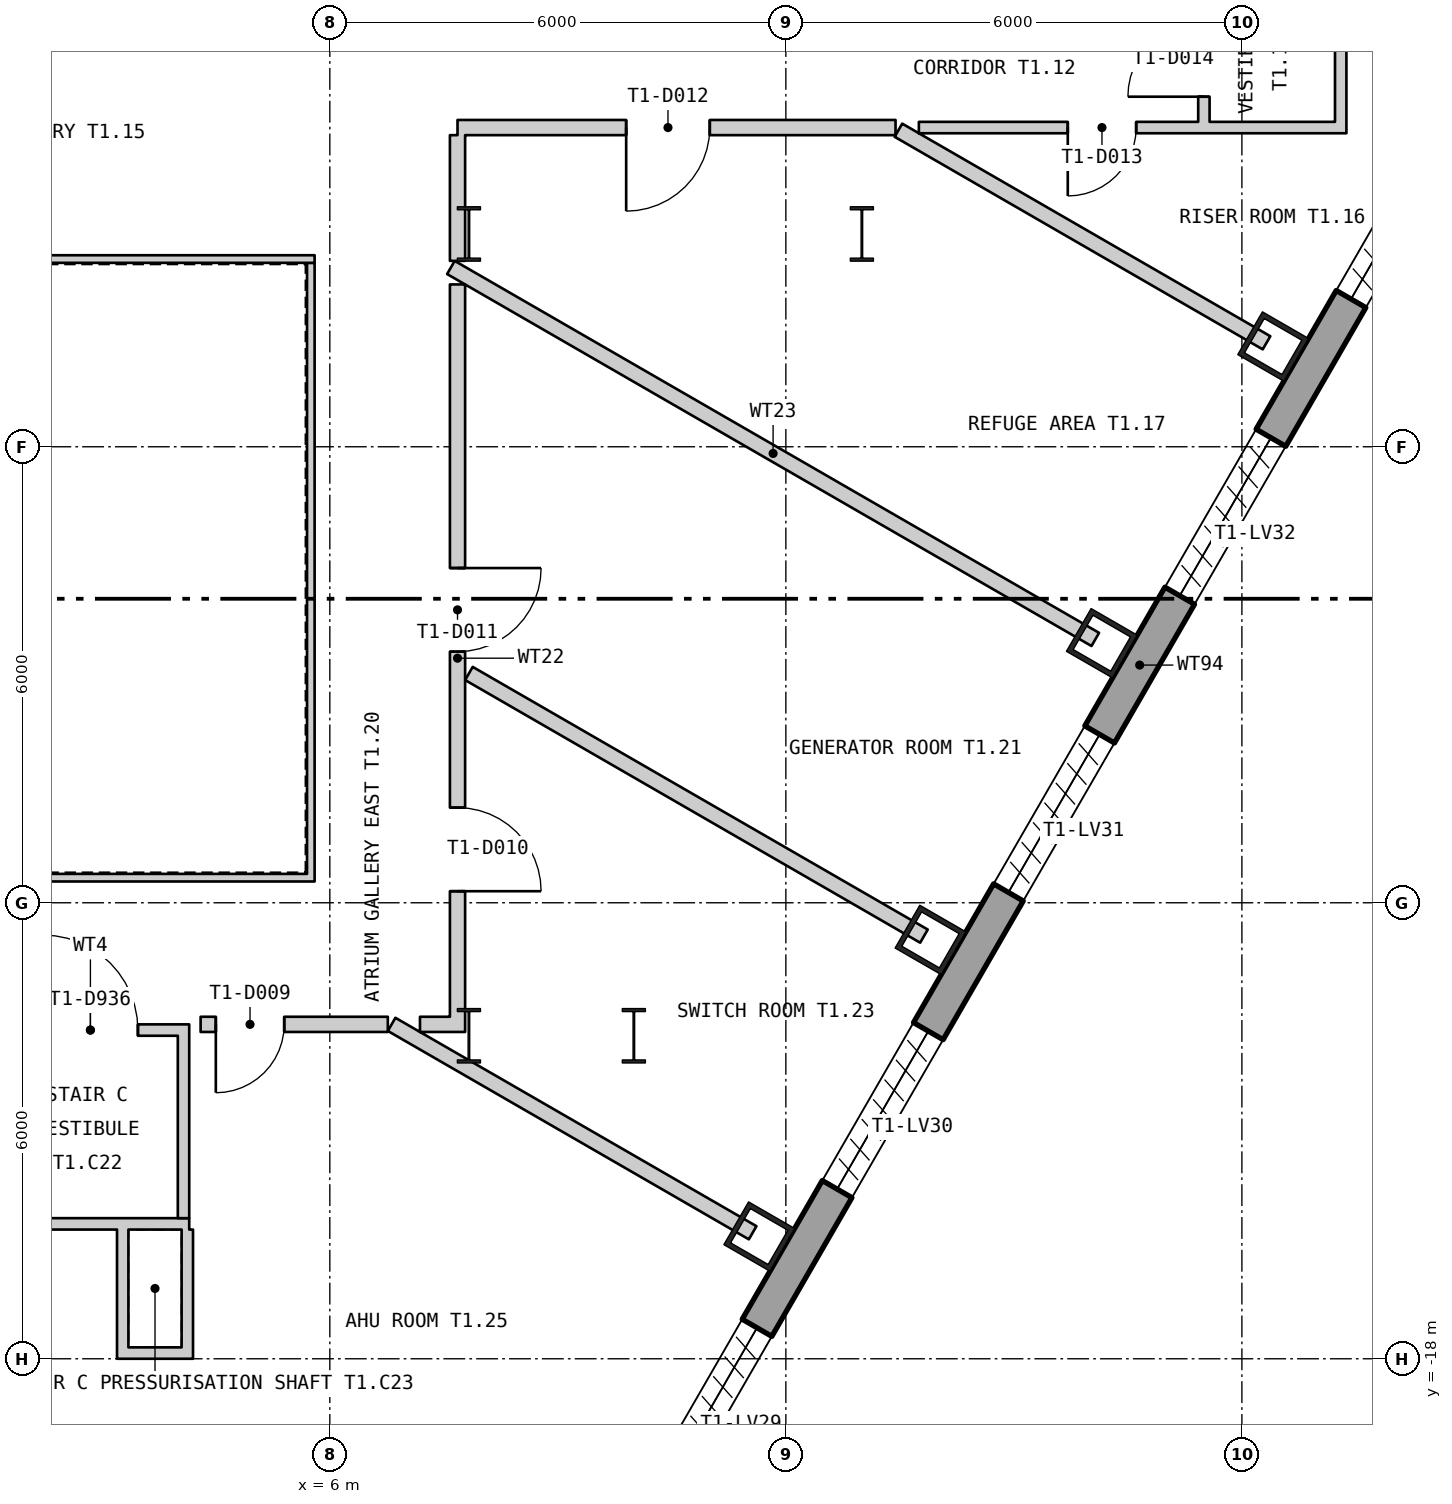
"""IFC4 building model, lengths in metres.
Left out: names, types, materials, properties, quantities, classifications, styles, units other than length and angle.
Written with IfcOpenShell. Run it as: python <this file> out.ifc"""

import sys

from ifc_helpers import new_model, si_unit, direction, frame, frame_2d, origin, origin_2d, place, context, subcontext, project, spatial, polyline, rectangle, hollow_rectangle, i_section, outline, extrude, element, fill, save


model = new_model("IFC4")
c1 = context("Model", 3, precision=1e-05, world=origin(), true_north=direction((0.0, 1.0)))
c2 = subcontext(c1, "Body", "Model", "MODEL_VIEW")
j1 = project(units=[si_unit("LENGTHUNIT", "METRE"), si_unit("PLANEANGLEUNIT", "RADIAN")], contexts=[c1])
p1 = place(None, origin())
s1 = spatial("IfcSite", under=j1, at=p1, CompositionType="ELEMENT")
p2 = place(p1, origin())
s2 = spatial("IfcBuilding", under=s1, at=p2, CompositionType="ELEMENT")
p3 = place(p2, frame((0.0, 0.0, 78.3)))
s3 = spatial("IfcBuildingStorey", under=s2, at=p3, CompositionType="ELEMENT", Elevation=78.3)
for number, where, z_axis, x_axis in (
    (1, (11.65, -16.392, 0.0), (0.0, 0.0, 1.0), (0.5, 0.866, 0.0)),
    (2, (13.903, -12.489, 0.0), (0.0, 0.0, 1.0), (0.5, 0.866, 0.0)),
    (3, (16.157, -8.585, 0.0), (0.0, 0.0, 1.0), (0.5, 0.866, 0.0)),
    (4, (18.411, -4.681, 0.0), (0.0, 0.0, 1.0), (0.5, 0.866, 0.0)),
):
    element("IfcColumn", number, at=place(p3, frame(where, z_axis=z_axis, x_axis=x_axis)), inside=s3, PredefinedType="COLUMN", context=c2, shape_type="SweptSolid", body=[
        extrude(hollow_rectangle(XDim=0.65, YDim=0.7, WallThickness=0.065, at=origin_2d()), origin(), (0.0, 0.0, 1.0), 6.0),
    ])
for number, where, z_axis, x_axis in (
    (5, (7.83, -3.2, 0.0), (0.0, 0.0, 1.0), (1.0, 0.0, 0.0)),
    (6, (7.83, -13.75, 0.0), (0.0, 0.0, 1.0), (1.0, 0.0, 0.0)),
    (7, (13.0, -3.2, 0.0), (0.0, 0.0, 1.0), (1.0, 0.0, 0.0)),
    (8, (10.0, -13.75, 0.0), (0.0, 0.0, 1.0), (1.0, 0.0, 0.0)),
):
    element("IfcColumn", number, at=place(p3, frame(where, z_axis=z_axis, x_axis=x_axis)), inside=s3, PredefinedType="COLUMN", context=c2, shape_type="SweptSolid", body=[
        extrude(i_section(OverallWidth=0.304, OverallDepth=0.716, WebThickness=0.021, FlangeThickness=0.04, at=origin_2d()), origin(), (0.0, 0.0, 1.0), 6.0),
    ])
p4 = place(p3, frame((5.22, -28.679, -0.18), z_axis=(0.0, 0.0, 1.0), x_axis=(0.500000711659, 0.866024992908, 0.0)))
e9 = element("IfcWall", 9, at=p4, inside=s3, PredefinedType="SOLIDWALL", context=c2, shape_type="SweptSolid", body=[
    extrude(outline(polyline([(-0.13, -0.225), (45.87, -0.225), (45.61, 0.225), (0.13, 0.225), (-0.13, -0.225)])), origin(), (0.0, 0.0, 1.0), 6.0),
])
p5 = place(p4, frame((1.424, 0.0, 1.38)))
e10 = element("IfcOpeningElement", 10, at=p5, cuts=e9, PredefinedType="OPENING", context=c2, shape_type="SweptSolid", body=[
    extrude(rectangle(XDim=2.4, YDim=3.6, at=frame_2d((1.2, 1.8))), frame((0.0, 0.235, 0.0), z_axis=(0.0, -1.0, 0.0), x_axis=(1.0, 0.0, 0.0)), (0.0, 0.0, 1.0), 0.47),
])
p6 = place(p4, frame((5.893, 0.0, 1.38)))
e11 = element("IfcOpeningElement", 11, at=p6, cuts=e9, PredefinedType="OPENING", context=c2, shape_type="SweptSolid", body=[
    extrude(rectangle(XDim=2.4, YDim=3.6, at=frame_2d((1.2, 1.8))), frame((0.0, 0.235, 0.0), z_axis=(0.0, -1.0, 0.0), x_axis=(1.0, 0.0, 0.0)), (0.0, 0.0, 1.0), 0.47),
])
p7 = place(p4, frame((10.401, 0.0, 1.38)))
e12 = element("IfcOpeningElement", 12, at=p7, cuts=e9, PredefinedType="OPENING", context=c2, shape_type="SweptSolid", body=[
    extrude(rectangle(XDim=2.4, YDim=3.6, at=frame_2d((1.2, 1.8))), frame((0.0, 0.235, 0.0), z_axis=(0.0, -1.0, 0.0), x_axis=(1.0, 0.0, 0.0)), (0.0, 0.0, 1.0), 0.47),
])
p8 = place(p4, frame((14.909, 0.0, 1.38)))
e13 = element("IfcOpeningElement", 13, at=p8, cuts=e9, PredefinedType="OPENING", context=c2, shape_type="SweptSolid", body=[
    extrude(rectangle(XDim=2.4, YDim=3.6, at=frame_2d((1.2, 1.8))), frame((0.0, 0.235, 0.0), z_axis=(0.0, -1.0, 0.0), x_axis=(1.0, 0.0, 0.0)), (0.0, 0.0, 1.0), 0.47),
])
p9 = place(p4, frame((19.416, 0.0, 1.38)))
e14 = element("IfcOpeningElement", 14, at=p9, cuts=e9, PredefinedType="OPENING", context=c2, shape_type="SweptSolid", body=[
    extrude(rectangle(XDim=2.4, YDim=3.6, at=frame_2d((1.2, 1.8))), frame((0.0, 0.235, 0.0), z_axis=(0.0, -1.0, 0.0), x_axis=(1.0, 0.0, 0.0)), (0.0, 0.0, 1.0), 0.47),
])
p10 = place(p4, frame((23.924, 0.0, 1.38)))
e15 = element("IfcOpeningElement", 15, at=p10, cuts=e9, PredefinedType="OPENING", context=c2, shape_type="SweptSolid", body=[
    extrude(rectangle(XDim=2.4, YDim=3.6, at=frame_2d((1.2, 1.8))), frame((0.0, 0.235, 0.0), z_axis=(0.0, -1.0, 0.0), x_axis=(1.0, 0.0, 0.0)), (0.0, 0.0, 1.0), 0.47),
])
p11 = place(p4, frame((28.431, 0.0, 1.38)))
e16 = element("IfcOpeningElement", 16, at=p11, cuts=e9, PredefinedType="OPENING", context=c2, shape_type="SweptSolid", body=[
    extrude(rectangle(XDim=2.4, YDim=3.6, at=frame_2d((1.2, 1.8))), frame((0.0, 0.235, 0.0), z_axis=(0.0, -1.0, 0.0), x_axis=(1.0, 0.0, 0.0)), (0.0, 0.0, 1.0), 0.47),
])
p12 = place(p4, frame((32.939, 0.0, 1.38)))
e17 = element("IfcOpeningElement", 17, at=p12, cuts=e9, PredefinedType="OPENING", context=c2, shape_type="SweptSolid", body=[
    extrude(rectangle(XDim=2.4, YDim=3.6, at=frame_2d((1.2, 1.8))), frame((0.0, 0.235, 0.0), z_axis=(0.0, -1.0, 0.0), x_axis=(1.0, 0.0, 0.0)), (0.0, 0.0, 1.0), 0.47),
])
p13 = place(p4, frame((37.447, 0.0, 1.38)))
e18 = element("IfcOpeningElement", 18, at=p13, cuts=e9, PredefinedType="OPENING", context=c2, shape_type="SweptSolid", body=[
    extrude(rectangle(XDim=2.4, YDim=3.6, at=frame_2d((1.2, 1.8))), frame((0.0, 0.235, 0.0), z_axis=(0.0, -1.0, 0.0), x_axis=(1.0, 0.0, 0.0)), (0.0, 0.0, 1.0), 0.47),
])
p14 = place(p4, frame((41.916, 0.0, 1.38)))
e19 = element("IfcOpeningElement", 19, at=p14, cuts=e9, PredefinedType="OPENING", context=c2, shape_type="SweptSolid", body=[
    extrude(rectangle(XDim=2.4, YDim=3.6, at=frame_2d((1.2, 1.8))), frame((0.0, 0.235, 0.0), z_axis=(0.0, -1.0, 0.0), x_axis=(1.0, 0.0, 0.0)), (0.0, 0.0, 1.0), 0.47),
])
p15 = place(p3, frame((-5.8, -11.67, 0.0), z_axis=(0.0, 0.0, 1.0), x_axis=(1.0, 0.0, 0.0)))
e20 = element("IfcWall", 20, at=p15, inside=s3, PredefinedType="PARTITIONING", context=c2, shape_type="SweptSolid", body=[
    extrude(rectangle(XDim=11.6, YDim=0.1, at=frame_2d((5.8, 0.0))), origin(), (0.0, 0.0, 1.0), 5.8),
])
p16 = place(p3, frame((5.75, -11.62, 0.0), z_axis=(0.0, 0.0, 1.0), x_axis=(0.0, 1.0, 0.0)))
e21 = element("IfcWall", 21, at=p16, inside=s3, PredefinedType="PARTITIONING", context=c2, shape_type="SweptSolid", body=[
    extrude(rectangle(XDim=8.04, YDim=0.1, at=frame_2d((4.02, 0.0))), origin(), (0.0, 0.0, 1.0), 5.8),
])
p17 = place(p3, frame((5.8, -3.53, 0.0), z_axis=(0.0, 0.0, 1.0), x_axis=(-1.0, 0.0, 0.0)))
e22 = element("IfcWall", 22, at=p17, inside=s3, PredefinedType="PARTITIONING", context=c2, shape_type="SweptSolid", body=[
    extrude(rectangle(XDim=11.6, YDim=0.1, at=frame_2d((5.8, 0.0))), origin(), (0.0, 0.0, 1.0), 5.8),
])
p18 = place(p3, frame((1.55, -16.225, 0.0), z_axis=(0.0, 0.0, 1.0), x_axis=(1.0, 0.0, 0.0)))
e23 = element("IfcWall", 23, at=p18, inside=s3, PredefinedType="PARTITIONING", context=c2, shape_type="SweptSolid", body=[
    extrude(rectangle(XDim=2.6, YDim=0.15, at=frame_2d((1.3, 0.0))), origin(), (0.0, 0.0, 1.0), 5.8),
])
p19 = place(p3, frame((4.075, -16.15, 0.0), z_axis=(0.0, 0.0, 1.0), x_axis=(0.0, 1.0, 0.0)))
e24 = element("IfcWall", 24, at=p19, inside=s3, PredefinedType="PARTITIONING", context=c2, shape_type="SweptSolid", body=[
    extrude(rectangle(XDim=2.4, YDim=0.15, at=frame_2d((1.2, 0.0))), origin(), (0.0, 0.0, 1.0), 5.8),
])
p20 = place(p3, frame((1.55, -13.675, 0.0), z_axis=(0.0, 0.0, 1.0), x_axis=(1.0, 0.0, 0.0)))
e25 = element("IfcWall", 25, at=p20, inside=s3, PredefinedType="PARTITIONING", context=c2, shape_type="SweptSolid", body=[
    extrude(rectangle(XDim=2.6, YDim=0.15, at=frame_2d((1.3, 0.0))), origin(), (0.0, 0.0, 1.0), 4.89),
])
p21 = place(p20, frame((0.675, 0.0, 0.0)))
e26 = element("IfcOpeningElement", 26, at=p21, cuts=e25, PredefinedType="OPENING", context=c2, shape_type="SweptSolid", body=[
    extrude(rectangle(XDim=1.25, YDim=2.1, at=frame_2d((0.625, 1.05))), frame((0.0, 0.085, 0.0), z_axis=(0.0, -1.0, 0.0), x_axis=(1.0, 0.0, 0.0)), (0.0, 0.0, 1.0), 0.17),
])
p22 = place(p3, frame((3.275, -18.0, 0.0), z_axis=(0.0, 0.0, 1.0), x_axis=(0.0, 1.0, 0.0)))
e27 = element("IfcWall", 27, at=p22, inside=s3, PredefinedType="PARTITIONING", context=c2, shape_type="SweptSolid", body=[
    extrude(rectangle(XDim=1.7, YDim=0.15, at=frame_2d((0.85, 0.0))), origin(), (0.0, 0.0, 1.0), 5.2),
])
p23 = place(p3, frame((3.35, -17.925, 0.0), z_axis=(0.0, 0.0, 1.0), x_axis=(1.0, 0.0, 0.0)))
e28 = element("IfcWall", 28, at=p23, inside=s3, PredefinedType="PARTITIONING", context=c2, shape_type="SweptSolid", body=[
    extrude(rectangle(XDim=0.7, YDim=0.15, at=frame_2d((0.35, 0.0))), origin(), (0.0, 0.0, 1.0), 5.8),
])
p24 = place(p3, frame((4.125, -18.0, 0.0), z_axis=(0.0, 0.0, 1.0), x_axis=(0.0, 1.0, 0.0)))
e29 = element("IfcWall", 29, at=p24, inside=s3, PredefinedType="PARTITIONING", context=c2, shape_type="SweptSolid", body=[
    extrude(rectangle(XDim=1.7, YDim=0.15, at=frame_2d((0.85, 0.0))), origin(), (0.0, 0.0, 1.0), 5.8),
])
p25 = place(p3, frame((4.3, -13.6, 0.0), z_axis=(0.0, 0.0, 1.0), x_axis=(1.0, 0.0, 0.0)))
e30 = element("IfcWall", 30, at=p25, inside=s3, PredefinedType="PARTITIONING", context=c2, shape_type="SweptSolid", body=[
    extrude(rectangle(XDim=2.463, YDim=0.2, at=frame_2d((1.232, 0.0))), origin(), (0.0, 0.0, 1.0), 4.89),
])
p26 = place(p25, frame((0.2, 0.0, 0.0)))
e31 = element("IfcOpeningElement", 31, at=p26, cuts=e30, PredefinedType="OPENING", context=c2, shape_type="SweptSolid", body=[
    extrude(rectangle(XDim=0.9, YDim=2.1, at=frame_2d((0.45, 1.05))), frame((0.0, 0.11, 0.0), z_axis=(0.0, -1.0, 0.0), x_axis=(1.0, 0.0, 0.0)), (0.0, 0.0, 1.0), 0.22),
])
p27 = place(p3, frame((6.813, -13.6, 0.0), z_axis=(0.0, 0.0, 1.0), x_axis=(0.866058069904, -0.499943416353, 0.0)))
e32 = element("IfcWall", 32, at=p27, inside=s3, PredefinedType="PARTITIONING", context=c2, shape_type="SweptSolid", body=[
    extrude(rectangle(XDim=5.485, YDim=0.2, at=frame_2d((2.742, 0.0))), origin(), (0.0, 0.0, 1.0), 5.8),
])
p28 = place(p3, frame((7.186, -13.6, 0.0), z_axis=(0.0, 0.0, 1.0), x_axis=(1.0, 0.0, 0.0)))
e33 = element("IfcWall", 33, at=p28, inside=s3, PredefinedType="PARTITIONING", context=c2, shape_type="SweptSolid", body=[
    extrude(rectangle(XDim=0.394, YDim=0.2, at=frame_2d((0.197, 0.0))), origin(), (0.0, 0.0, 1.0), 5.8),
])
p29 = place(p3, frame((7.593, -3.641, 0.0), z_axis=(0.0, 0.0, 1.0), x_axis=(0.866059708757, -0.499940577336, 0.0)))
e34 = element("IfcWall", 34, at=p29, inside=s3, PredefinedType="PARTITIONING", context=c2, shape_type="SweptSolid", body=[
    extrude(rectangle(XDim=9.789, YDim=0.2, at=frame_2d((4.895, 0.0))), origin(), (0.0, 0.0, 1.0), 5.8),
])
p30 = place(p3, frame((7.68, -13.7, 0.0), z_axis=(0.0, 0.0, 1.0), x_axis=(0.0, 1.0, 0.0)))
e35 = element("IfcWall", 35, at=p30, inside=s3, PredefinedType="PARTITIONING", context=c2, shape_type="SweptSolid", body=[
    extrude(rectangle(XDim=9.836, YDim=0.2, at=frame_2d((4.918, 0.0))), origin(), (0.0, 0.0, 1.0), 5.2),
])
p31 = place(p30, frame((1.852, 0.0, 0.0)))
e36 = element("IfcOpeningElement", 36, at=p31, cuts=e35, PredefinedType="OPENING", context=c2, shape_type="SweptSolid", body=[
    extrude(rectangle(XDim=1.1, YDim=2.1, at=frame_2d((0.55, 1.05))), frame((0.0, 0.11, 0.0), z_axis=(0.0, -1.0, 0.0), x_axis=(1.0, 0.0, 0.0)), (0.0, 0.0, 1.0), 0.22),
])
p32 = place(p30, frame((5.004, 0.0, 0.0)))
e37 = element("IfcOpeningElement", 37, at=p32, cuts=e35, PredefinedType="OPENING", context=c2, shape_type="SweptSolid", body=[
    extrude(rectangle(XDim=1.1, YDim=2.1, at=frame_2d((0.55, 1.05))), frame((0.0, 0.11, 0.0), z_axis=(0.0, -1.0, 0.0), x_axis=(1.0, 0.0, 0.0)), (0.0, 0.0, 1.0), 0.22),
])
p33 = place(p3, frame((7.68, -3.554, 0.0), z_axis=(0.0, 0.0, 1.0), x_axis=(0.0, 1.0, 0.0)))
e38 = element("IfcWall", 38, at=p33, inside=s3, PredefinedType="PARTITIONING", context=c2, shape_type="SweptSolid", body=[
    extrude(rectangle(XDim=1.654, YDim=0.2, at=frame_2d((0.827, 0.0))), origin(), (0.0, 0.0, 1.0), 5.8),
])
p34 = place(p3, frame((7.68, -1.8, 0.0), z_axis=(0.0, 0.0, 1.0), x_axis=(1.0, 0.0, 0.0)))
e39 = element("IfcWall", 39, at=p34, inside=s3, PredefinedType="PARTITIONING", context=c2, shape_type="SweptSolid", body=[
    extrude(rectangle(XDim=5.763, YDim=0.2, at=frame_2d((2.881, 0.0))), origin(), (0.0, 0.0, 1.0), 5.8),
])
p35 = place(p34, frame((2.219, 0.0, 0.0)))
e40 = element("IfcOpeningElement", 40, at=p35, cuts=e39, PredefinedType="OPENING", context=c2, shape_type="SweptSolid", body=[
    extrude(rectangle(XDim=1.1, YDim=2.1, at=frame_2d((0.55, 1.05))), frame((0.0, 0.11, 0.0), z_axis=(0.0, -1.0, 0.0), x_axis=(1.0, 0.0, 0.0)), (0.0, 0.0, 1.0), 0.22),
])
p36 = place(p3, frame((7.83, -8.983, 0.0), z_axis=(0.0, 0.0, 1.0), x_axis=(0.866062737724, -0.499935330144, 0.0)))
e41 = element("IfcWall", 41, at=p36, inside=s3, PredefinedType="PARTITIONING", context=c2, shape_type="SweptSolid", body=[
    extrude(rectangle(XDim=6.913, YDim=0.2, at=frame_2d((3.456, 0.0))), origin(), (0.0, 0.0, 1.0), 5.8),
])
p37 = place(p3, frame((13.481, -1.835, 0.0), z_axis=(0.0, 0.0, 1.0), x_axis=(0.865956282224, -0.500119702949, 0.0)))
e42 = element("IfcWall", 42, at=p37, inside=s3, PredefinedType="PARTITIONING", context=c2, shape_type="SweptSolid", body=[
    extrude(rectangle(XDim=5.593, YDim=0.2, at=frame_2d((2.796, 0.0))), origin(), (0.0, 0.0, 1.0), 5.8),
])
p38 = place(p3, frame((13.75, -1.8, 0.0), z_axis=(0.0, 0.0, 1.0), x_axis=(1.0, 0.0, 0.0)))
e43 = element("IfcWall", 43, at=p38, inside=s3, PredefinedType="PARTITIONING", context=c2, shape_type="SweptSolid", body=[
    extrude(rectangle(XDim=5.475, YDim=0.15, at=frame_2d((2.737, 0.0))), origin(), (0.0, 0.0, 1.0), 5.8),
])
p39 = place(p38, frame((1.959, 0.0, 0.0)))
e44 = element("IfcOpeningElement", 44, at=p39, cuts=e43, PredefinedType="OPENING", context=c2, shape_type="SweptSolid", body=[
    extrude(rectangle(XDim=0.9, YDim=2.1, at=frame_2d((0.45, 1.05))), frame((0.0, 0.085, 0.0), z_axis=(0.0, -1.0, 0.0), x_axis=(1.0, 0.0, 0.0)), (0.0, 0.0, 1.0), 0.17),
])
p40 = place(p3, frame((17.5, -1.725, 0.0), z_axis=(0.0, 0.0, 1.0), x_axis=(0.0, 1.0, 0.0)))
e45 = element("IfcWall", 45, at=p40, inside=s3, PredefinedType="PARTITIONING", context=c2, shape_type="SweptSolid", body=[
    extrude(rectangle(XDim=1.662, YDim=0.15, at=frame_2d((0.831, 0.0))), origin(), (0.0, 0.0, 1.0), 5.8),
])
p41 = place(p40, frame((0.331, 0.0, 0.0)))
e46 = element("IfcOpeningElement", 46, at=p41, cuts=e45, PredefinedType="OPENING", context=c2, shape_type="SweptSolid", body=[
    extrude(rectangle(XDim=1.0, YDim=2.1, at=frame_2d((0.5, 1.05))), frame((0.0, 0.085, 0.0), z_axis=(0.0, -1.0, 0.0), x_axis=(1.0, 0.0, 0.0)), (0.0, 0.0, 1.0), 0.17),
])
p42 = place(p3, frame((19.3, -1.875, 0.0), z_axis=(0.0, 0.0, 1.0), x_axis=(0.0, 1.0, 0.0)))
e47 = element("IfcWall", 47, at=p42, inside=s3, PredefinedType="PARTITIONING", context=c2, shape_type="SweptSolid", body=[
    extrude(rectangle(XDim=12.136, YDim=0.15, at=frame_2d((6.068, 0.0))), origin(), (0.0, 0.0, 1.0), 5.8),
])
p43 = place(p42, frame((3.987, 0.0, 0.0)))
e48 = element("IfcOpeningElement", 48, at=p43, cuts=e47, PredefinedType="OPENING", context=c2, shape_type="SweptSolid", body=[
    extrude(rectangle(XDim=0.9, YDim=2.1, at=frame_2d((0.45, 1.05))), frame((0.0, 0.085, 0.0), z_axis=(0.0, -1.0, 0.0), x_axis=(1.0, 0.0, 0.0)), (0.0, 0.0, 1.0), 0.17),
])
p44 = place(p42, frame((9.112, 0.0, 0.0)))
e49 = element("IfcOpeningElement", 49, at=p44, cuts=e47, PredefinedType="OPENING", context=c2, shape_type="SweptSolid", body=[
    extrude(rectangle(XDim=0.9, YDim=2.1, at=frame_2d((0.45, 1.05))), frame((0.0, 0.085, 0.0), z_axis=(0.0, -1.0, 0.0), x_axis=(1.0, 0.0, 0.0)), (0.0, 0.0, 1.0), 0.17),
])
p45 = place(p21, origin())
e50 = element("IfcDoor", 50, at=p45, inside=s3, OperationType="SINGLE_SWING_RIGHT", PredefinedType="DOOR", context=c2, shape_type="SweptSolid", body=[
    extrude(rectangle(XDim=1.25, YDim=2.1, at=frame_2d((0.625, 1.05))), frame((0.0, 0.025, 0.0), z_axis=(0.0, -1.0, 0.0), x_axis=(1.0, 0.0, 0.0)), (0.0, 0.0, 1.0), 0.05),
])
fill(e26, e50)
p46 = place(p26, origin())
e51 = element("IfcDoor", 51, at=p46, inside=s3, OperationType="SINGLE_SWING_LEFT", PredefinedType="DOOR", context=c2, shape_type="SweptSolid", body=[
    extrude(rectangle(XDim=0.9, YDim=2.1, at=frame_2d((0.45, 1.05))), frame((0.0, 0.025, 0.0), z_axis=(0.0, -1.0, 0.0), x_axis=(1.0, 0.0, 0.0)), (0.0, 0.0, 1.0), 0.05),
])
fill(e31, e51)
p47 = place(p31, origin())
e52 = element("IfcDoor", 52, at=p47, inside=s3, OperationType="SINGLE_SWING_LEFT", PredefinedType="DOOR", context=c2, shape_type="SweptSolid", body=[
    extrude(rectangle(XDim=1.1, YDim=2.1, at=frame_2d((0.55, 1.05))), frame((0.0, 0.025, 0.0), z_axis=(0.0, -1.0, 0.0), x_axis=(1.0, 0.0, 0.0)), (0.0, 0.0, 1.0), 0.05),
])
fill(e36, e52)
p48 = place(p32, origin())
e53 = element("IfcDoor", 53, at=p48, inside=s3, OperationType="SINGLE_SWING_RIGHT", PredefinedType="DOOR", context=c2, shape_type="SweptSolid", body=[
    extrude(rectangle(XDim=1.1, YDim=2.1, at=frame_2d((0.55, 1.05))), frame((0.0, 0.025, 0.0), z_axis=(0.0, -1.0, 0.0), x_axis=(1.0, 0.0, 0.0)), (0.0, 0.0, 1.0), 0.05),
])
fill(e37, e53)
p49 = place(p35, origin())
e54 = element("IfcDoor", 54, at=p49, inside=s3, OperationType="SINGLE_SWING_LEFT", PredefinedType="DOOR", context=c2, shape_type="SweptSolid", body=[
    extrude(rectangle(XDim=1.1, YDim=2.1, at=frame_2d((0.55, 1.05))), frame((0.0, 0.025, 0.0), z_axis=(0.0, -1.0, 0.0), x_axis=(1.0, 0.0, 0.0)), (0.0, 0.0, 1.0), 0.05),
])
fill(e40, e54)
p50 = place(p39, origin())
e55 = element("IfcDoor", 55, at=p50, inside=s3, OperationType="SINGLE_SWING_LEFT", PredefinedType="DOOR", context=c2, shape_type="SweptSolid", body=[
    extrude(rectangle(XDim=0.9, YDim=2.1, at=frame_2d((0.45, 1.05))), frame((0.0, 0.025, 0.0), z_axis=(0.0, -1.0, 0.0), x_axis=(1.0, 0.0, 0.0)), (0.0, 0.0, 1.0), 0.05),
])
fill(e44, e55)
p51 = place(p41, origin())
e56 = element("IfcDoor", 56, at=p51, inside=s3, OperationType="SINGLE_SWING_RIGHT", PredefinedType="DOOR", context=c2, shape_type="SweptSolid", body=[
    extrude(rectangle(XDim=1.0, YDim=2.1, at=frame_2d((0.5, 1.05))), frame((0.0, 0.025, 0.0), z_axis=(0.0, -1.0, 0.0), x_axis=(1.0, 0.0, 0.0)), (0.0, 0.0, 1.0), 0.05),
])
fill(e46, e56)
save(model, sys.argv[1])
